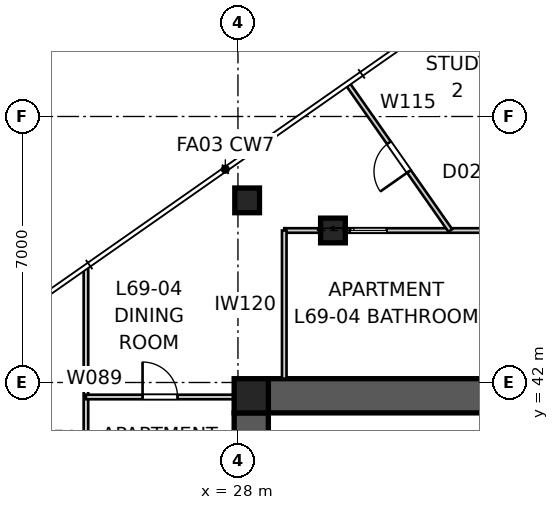
"""IFC4 building model, lengths in metres.
Left out: names, types, materials, properties, quantities, classifications, styles, units other than length and angle.
Written with IfcOpenShell. Run it as: python <this file> out.ifc"""

import sys

from ifc_helpers import new_model, si_unit, direction, frame, frame_2d, origin, origin_2d, place, context, subcontext, project, spatial, polyline, rectangle, outline, extrude, element, fill, save


model = new_model("IFC4")
c1 = context("Model", 3, precision=1e-05, world=origin(), true_north=direction((0.0, 1.0)))
c2 = subcontext(c1, "Body", "Model", "MODEL_VIEW")
j1 = project(units=[si_unit("LENGTHUNIT", "METRE"), si_unit("PLANEANGLEUNIT", "RADIAN")], contexts=[c1])
p1 = place(None, origin())
s1 = spatial("IfcSite", under=j1, at=p1, CompositionType="ELEMENT")
p2 = place(p1, origin())
s2 = spatial("IfcBuilding", under=s1, at=p2, CompositionType="ELEMENT")
p3 = place(p2, frame((0.0, 0.0, 250.6)))
s3 = spatial("IfcBuildingStorey", under=s2, at=p3, CompositionType="ELEMENT", Elevation=250.6)
p4 = place(p3, frame((28.8, 41.65, 0.0), z_axis=(0.0, 0.0, 1.0), x_axis=(1.0, 0.0, 0.0)))
e1 = element("IfcWall", 1, at=p4, inside=s3, PredefinedType="SHEAR", context=c2, shape_type="SweptSolid", body=[
    extrude(outline(polyline([(0.0, -0.45), (22.4, -0.45), (22.4, -0.025), (22.85, -0.025), (22.85, 0.025), (22.4, 0.025), (22.4, 0.45), (0.0, 0.45), (0.0, 0.025), (-0.45, 0.025), (-0.45, -0.025), (0.0, -0.025), (0.0, -0.45)])), origin(), (0.0, 0.0, 1.0), 3.4),
])
p5 = place(p3, frame((28.35, 41.2, 0.0), z_axis=(0.0, 0.0, 1.0), x_axis=(0.0, -1.0, 0.0)))
e2 = element("IfcWall", 2, at=p5, inside=s3, PredefinedType="SHEAR", context=c2, shape_type="SweptSolid", body=[
    extrude(outline(polyline([(0.0, -0.45), (22.4, -0.45), (22.4, -0.025), (22.85, -0.025), (22.85, 0.025), (22.4, 0.025), (22.4, 0.45), (0.0, 0.45), (0.0, 0.025), (-0.45, 0.025), (-0.45, -0.025), (0.0, -0.025), (0.0, -0.45)])), origin(), (0.0, 0.0, 1.0), 3.4),
])
p6 = place(p5, frame((11.14, 0.0, 0.0)))
e3 = element("IfcOpeningElement", 3, at=p6, cuts=e2, PredefinedType="OPENING", context=c2, shape_type="SweptSolid", body=[
    extrude(rectangle(XDim=1.02, YDim=2.4, at=frame_2d((0.51, 1.2))), frame((0.0, 0.46, 0.0), z_axis=(0.0, -1.0, 0.0), x_axis=(1.0, 0.0, 0.0)), (0.0, 0.0, 1.0), 0.92),
])
p7 = place(p3, frame((28.35, 41.65, 0.0), z_axis=(0.0, 0.0, 1.0), x_axis=(1.0, 0.0, 0.0)))
e4 = element("IfcColumn", 4, at=p7, inside=s3, PredefinedType="COLUMN", context=c2, shape_type="SweptSolid", body=[
    extrude(rectangle(XDim=0.9, YDim=0.9, at=origin_2d()), origin(), (0.0, 0.0, 1.0), 3.4),
])
for number, where, z_axis, x_axis in (
    (5, (28.242, 46.793, 0.0), (0.0, 0.0, 1.0), (1.0, 0.0, 0.0)),
    (6, (30.5, 46.0, 0.0), (0.0, 0.0, 1.0), (1.0, 0.0, 0.0)),
):
    element("IfcColumn", number, at=place(p3, frame(where, z_axis=z_axis, x_axis=x_axis)), inside=s3, PredefinedType="COLUMN", context=c2, shape_type="SweptSolid", body=[
        extrude(rectangle(XDim=0.65, YDim=0.65, at=origin_2d()), origin(), (0.0, 0.0, 1.0), 3.4),
    ])
p8 = place(p3, frame((24.0, 18.797, 0.0), z_axis=(0.0, 0.0, 1.0), x_axis=(0.0, 1.0, 0.0)))
e7 = element("IfcWall", 7, at=p8, inside=s3, PredefinedType="PARTITIONING", context=c2, shape_type="SweptSolid", body=[
    extrude(rectangle(XDim=26.198, YDim=0.12, at=frame_2d((13.099, 0.0))), origin(), (0.0, 0.0, 1.0), 2.55),
])
p9 = place(p8, frame((8.016, 0.0, 0.0)))
e8 = element("IfcOpeningElement", 8, at=p9, cuts=e7, PredefinedType="OPENING", context=c2, shape_type="SweptSolid", body=[
    extrude(rectangle(XDim=0.92, YDim=2.34, at=frame_2d((0.46, 1.17))), frame((0.0, 0.07, 0.0), z_axis=(0.0, -1.0, 0.0), x_axis=(1.0, 0.0, 0.0)), (0.0, 0.0, 1.0), 0.14),
])
p10 = place(p8, frame((16.292, 0.0, 0.0)))
e9 = element("IfcOpeningElement", 9, at=p10, cuts=e7, PredefinedType="OPENING", context=c2, shape_type="SweptSolid", body=[
    extrude(rectangle(XDim=0.92, YDim=2.34, at=frame_2d((0.46, 1.17))), frame((0.0, 0.07, 0.0), z_axis=(0.0, -1.0, 0.0), x_axis=(1.0, 0.0, 0.0)), (0.0, 0.0, 1.0), 0.14),
])
p11 = place(p3, frame((24.0, 41.619, 0.0), z_axis=(0.0, 0.0, 1.0), x_axis=(1.0, 0.0, 0.0)))
e10 = element("IfcWall", 10, at=p11, inside=s3, PredefinedType="PARTITIONING", context=c2, shape_type="SweptSolid", body=[
    extrude(rectangle(XDim=3.9, YDim=0.12, at=frame_2d((1.95, 0.0))), origin(), (0.0, 0.0, 1.0), 3.25),
])
p12 = place(p11, frame((1.49, 0.0, 0.0)))
e11 = element("IfcOpeningElement", 11, at=p12, cuts=e10, PredefinedType="OPENING", context=c2, shape_type="SweptSolid", body=[
    extrude(rectangle(XDim=0.92, YDim=2.1, at=frame_2d((0.46, 1.05))), frame((0.0, 0.07, 0.0), z_axis=(0.0, -1.0, 0.0), x_axis=(1.0, 0.0, 0.0)), (0.0, 0.0, 1.0), 0.14),
])
p13 = place(p3, frame((29.219, 46.0, 0.0), z_axis=(0.0, 0.0, 1.0), x_axis=(1.0, 0.0, 0.0)))
e12 = element("IfcWall", 12, at=p13, inside=s3, PredefinedType="PARTITIONING", context=c2, shape_type="SweptSolid", body=[
    extrude(rectangle(XDim=11.034, YDim=0.12, at=frame_2d((5.517, 0.0))), origin(), (0.0, 0.0, 1.0), 2.55),
])
p14 = place(p13, frame((1.735, 0.0, 0.0)))
e13 = element("IfcOpeningElement", 13, at=p14, cuts=e12, PredefinedType="OPENING", context=c2, shape_type="SweptSolid", body=[
    extrude(rectangle(XDim=0.96, YDim=2.1, at=frame_2d((0.48, 1.05))), frame((0.0, 0.07, 0.0), z_axis=(0.0, -1.0, 0.0), x_axis=(1.0, 0.0, 0.0)), (0.0, 0.0, 1.0), 0.14),
])
p15 = place(p13, frame((7.363, 0.0, 0.0)))
e14 = element("IfcOpeningElement", 14, at=p15, cuts=e12, PredefinedType="OPENING", context=c2, shape_type="SweptSolid", body=[
    extrude(rectangle(XDim=0.96, YDim=2.1, at=frame_2d((0.48, 1.05))), frame((0.0, 0.07, 0.0), z_axis=(0.0, -1.0, 0.0), x_axis=(1.0, 0.0, 0.0)), (0.0, 0.0, 1.0), 0.14),
])
p16 = place(p3, frame((29.219, 42.1, 0.0), z_axis=(0.0, 0.0, 1.0), x_axis=(0.0, 1.0, 0.0)))
e15 = element("IfcWall", 15, at=p16, inside=s3, PredefinedType="PARTITIONING", context=c2, shape_type="SweptSolid", body=[
    extrude(rectangle(XDim=3.9, YDim=0.12, at=frame_2d((1.95, 0.0))), origin(), (0.0, 0.0, 1.0), 3.25),
])
p17 = place(p3, frame((33.588, 46.0, 0.0), z_axis=(0.0, 0.0, 1.0), x_axis=(-0.57355695423, 0.819165685472, 0.0)))
e16 = element("IfcWall", 16, at=p17, inside=s3, PredefinedType="PARTITIONING", context=c2, shape_type="SweptSolid", body=[
    extrude(rectangle(XDim=4.676, YDim=0.12, at=frame_2d((2.338, 0.0))), origin(), (0.0, 0.0, 1.0), 3.25),
])
p18 = place(p17, frame((1.898, 0.0, 0.0)))
e17 = element("IfcOpeningElement", 17, at=p18, cuts=e16, PredefinedType="OPENING", context=c2, shape_type="SweptSolid", body=[
    extrude(rectangle(XDim=0.92, YDim=2.34, at=frame_2d((0.46, 1.17))), frame((0.0, 0.07, 0.0), z_axis=(0.0, -1.0, 0.0), x_axis=(1.0, 0.0, 0.0)), (0.0, 0.0, 1.0), 0.14),
])
p19 = place(p3, frame((27.9, 41.619, 0.0), z_axis=(0.0, 0.0, 1.0), x_axis=(0.999397924003, 0.034695669724, 0.0)))
e18 = element("IfcWall", 18, at=p19, inside=s3, PredefinedType="PARTITIONING", context=c2, shape_type="SweptSolid", body=[
    extrude(rectangle(XDim=0.901, YDim=0.12, at=frame_2d((0.45, 0.0))), origin(), (0.0, 0.0, 1.0), 3.25),
])
p20 = place(p12, origin())
e19 = element("IfcDoor", 19, at=p20, inside=s3, OperationType="SINGLE_SWING_LEFT", PredefinedType="DOOR", context=c2, shape_type="SweptSolid", body=[
    extrude(rectangle(XDim=0.92, YDim=2.1, at=frame_2d((0.46, 1.05))), frame((0.0, 0.025, 0.0), z_axis=(0.0, -1.0, 0.0), x_axis=(1.0, 0.0, 0.0)), (0.0, 0.0, 1.0), 0.05),
])
fill(e11, e19)
p21 = place(p18, origin())
e20 = element("IfcDoor", 20, at=p21, inside=s3, OperationType="SINGLE_SWING_LEFT", PredefinedType="DOOR", context=c2, shape_type="SweptSolid", body=[
    extrude(rectangle(XDim=0.92, YDim=2.34, at=frame_2d((0.46, 1.17))), frame((0.0, 0.025, 0.0), z_axis=(0.0, -1.0, 0.0), x_axis=(1.0, 0.0, 0.0)), (0.0, 0.0, 1.0), 0.05),
])
fill(e17, e20)
p22 = place(p14, origin())
e21 = element("IfcDoor", 21, at=p22, inside=s3, OperationType="SLIDING_TO_LEFT", PredefinedType="DOOR", context=c2, shape_type="SweptSolid", body=[
    extrude(rectangle(XDim=0.96, YDim=2.1, at=frame_2d((0.48, 1.05))), frame((0.0, 0.025, 0.0), z_axis=(0.0, -1.0, 0.0), x_axis=(1.0, 0.0, 0.0)), (0.0, 0.0, 1.0), 0.05),
])
fill(e13, e21)
save(model, sys.argv[1])
